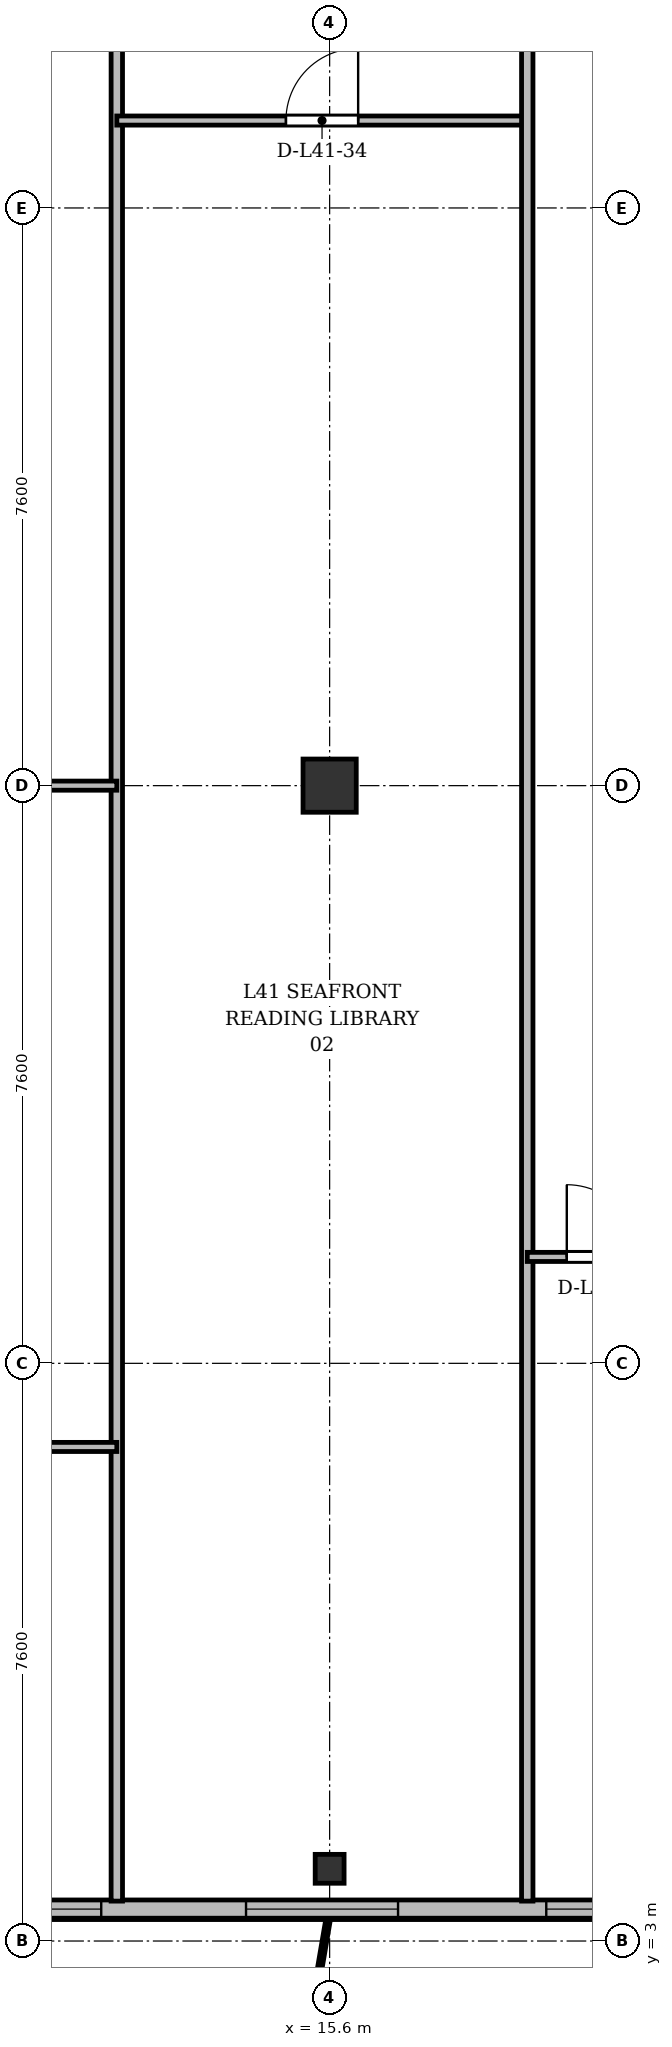
"""IFC4 building model, lengths in metres.
Left out: names, types, materials, properties, quantities, classifications, styles, units other than length and angle.
Written with IfcOpenShell. Run it as: python <this file> out.ifc"""

import sys

from ifc_helpers import new_model, si_unit, direction, frame, frame_2d, origin, origin_2d, place, context, subcontext, project, spatial, rectangle, i_section, extrude, source, transform, mapped, element, fill, save


model = new_model("IFC4")
c1 = context("Model", 3, precision=1e-05, world=origin(), true_north=direction((0.0, 1.0)))
c2 = subcontext(c1, "Body", "Model", "MODEL_VIEW")
j1 = project(units=[si_unit("LENGTHUNIT", "METRE"), si_unit("PLANEANGLEUNIT", "RADIAN")], contexts=[c1])
p1 = place(None, origin())
s1 = spatial("IfcSite", under=j1, at=p1, CompositionType="ELEMENT")
p2 = place(p1, origin())
s2 = spatial("IfcBuilding", under=s1, at=p2, CompositionType="ELEMENT")
p3 = place(p2, frame((0.0, 0.0, 157.3)))
s3 = spatial("IfcBuildingStorey", under=s2, at=p3, CompositionType="ELEMENT", Elevation=157.3)
m1 = source(origin(), c2, "Body", "SweptSolid", [
    extrude(i_section(OverallWidth=0.38, OverallDepth=0.38, WebThickness=0.02, FlangeThickness=0.03, at=origin_2d()), origin(), (0.0, 0.0, 1.0), 3.6),
])
p4 = place(p3, frame((15.6, 3.95, 0.0), z_axis=(0.0, 0.0, 1.0), x_axis=(1.0, 0.0, 0.0)))
e1 = element("IfcColumn", 1, at=p4, inside=s3, PredefinedType="COLUMN", context=c2, shape_type="MappedRepresentation", body=[
    mapped(m1, transform((0.0, 0.0, 0.0), x_axis=(1.0, 0.0, 0.0), y_axis=(0.0, 1.0, 0.0), z_axis=(0.0, 0.0, 1.0), scale=1.0)),
])
m2 = source(origin(), c2, "Body", "SweptSolid", [
    extrude(rectangle(XDim=0.7, YDim=0.7, at=origin_2d()), origin(), (0.0, 0.0, 1.0), 3.6),
])
p5 = place(p3, frame((15.6, 18.2, 0.0), z_axis=(0.0, 0.0, 1.0), x_axis=(1.0, 0.0, 0.0)))
e2 = element("IfcColumn", 2, at=p5, inside=s3, PredefinedType="COLUMN", context=c2, shape_type="MappedRepresentation", body=[
    mapped(m2, transform((0.0, 0.0, 0.0), x_axis=(1.0, 0.0, 0.0), y_axis=(0.0, 1.0, 0.0), z_axis=(0.0, 0.0, 1.0), scale=1.0)),
])
p6 = place(p3, frame((63.6, 3.42, 0.0), z_axis=(0.0, 0.0, 1.0), x_axis=(-1.0, 0.0, 0.0)))
e3 = element("IfcWall", 3, at=p6, inside=s3, PredefinedType="SOLIDWALL", context=c2, shape_type="SweptSolid", body=[
    extrude(rectangle(XDim=52.8, YDim=0.24, at=frame_2d((26.4, 0.0))), origin(), (0.0, 0.0, 1.0), 3.35),
])
p7 = place(p6, frame((0.295, 0.0, 0.9)))
e4 = element("IfcOpeningElement", 4, at=p7, cuts=e3, PredefinedType="OPENING", context=c2, shape_type="SweptSolid", body=[
    extrude(rectangle(XDim=1.5, YDim=1.75, at=frame_2d((0.75, 0.875))), frame((0.0, 0.13, 0.0), z_axis=(0.0, -1.0, 0.0), x_axis=(1.0, 0.0, 0.0)), (0.0, 0.0, 1.0), 0.26),
])
p8 = place(p6, frame((3.95, 0.0, 0.9)))
e5 = element("IfcOpeningElement", 5, at=p8, cuts=e3, PredefinedType="OPENING", context=c2, shape_type="SweptSolid", body=[
    extrude(rectangle(XDim=1.5, YDim=1.75, at=frame_2d((0.75, 0.875))), frame((0.0, 0.13, 0.0), z_axis=(0.0, -1.0, 0.0), x_axis=(1.0, 0.0, 0.0)), (0.0, 0.0, 1.0), 0.26),
])
p9 = place(p6, frame((7.635, 0.0, 0.0)))
e6 = element("IfcOpeningElement", 6, at=p9, cuts=e3, PredefinedType="OPENING", context=c2, shape_type="SweptSolid", body=[
    extrude(rectangle(XDim=1.2, YDim=2.2, at=frame_2d((0.6, 1.1))), frame((0.0, 0.13, 0.0), z_axis=(0.0, -1.0, 0.0), x_axis=(1.0, 0.0, 0.0)), (0.0, 0.0, 1.0), 0.26),
])
p10 = place(p6, frame((9.775, 0.0, 0.9)))
e7 = element("IfcOpeningElement", 7, at=p10, cuts=e3, PredefinedType="OPENING", context=c2, shape_type="SweptSolid", body=[
    extrude(rectangle(XDim=1.65, YDim=1.85, at=frame_2d((0.825, 0.925))), frame((0.0, 0.13, 0.0), z_axis=(0.0, -1.0, 0.0), x_axis=(1.0, 0.0, 0.0)), (0.0, 0.0, 1.0), 0.26),
])
p11 = place(p6, frame((12.1, 0.0, 0.9)))
e8 = element("IfcOpeningElement", 8, at=p11, cuts=e3, PredefinedType="OPENING", context=c2, shape_type="SweptSolid", body=[
    extrude(rectangle(XDim=1.8, YDim=1.8, at=frame_2d((0.9, 0.9))), frame((0.0, 0.13, 0.0), z_axis=(0.0, -1.0, 0.0), x_axis=(1.0, 0.0, 0.0)), (0.0, 0.0, 1.0), 0.26),
])
p12 = place(p6, frame((15.9, 0.0, 0.9)))
e9 = element("IfcOpeningElement", 9, at=p12, cuts=e3, PredefinedType="OPENING", context=c2, shape_type="SweptSolid", body=[
    extrude(rectangle(XDim=2.2, YDim=1.8, at=frame_2d((1.1, 0.9))), frame((0.0, 0.13, 0.0), z_axis=(0.0, -1.0, 0.0), x_axis=(1.0, 0.0, 0.0)), (0.0, 0.0, 1.0), 0.26),
])
p13 = place(p6, frame((22.65, 0.0, 0.9)))
e10 = element("IfcOpeningElement", 10, at=p13, cuts=e3, PredefinedType="OPENING", context=c2, shape_type="SweptSolid", body=[
    extrude(rectangle(XDim=1.5, YDim=1.75, at=frame_2d((0.75, 0.875))), frame((0.0, 0.13, 0.0), z_axis=(0.0, -1.0, 0.0), x_axis=(1.0, 0.0, 0.0)), (0.0, 0.0, 1.0), 0.26),
])
p14 = place(p6, frame((27.5, 0.0, 0.9)))
e11 = element("IfcOpeningElement", 11, at=p14, cuts=e3, PredefinedType="OPENING", context=c2, shape_type="SweptSolid", body=[
    extrude(rectangle(XDim=2.0, YDim=1.95, at=frame_2d((1.0, 0.975))), frame((0.0, 0.13, 0.0), z_axis=(0.0, -1.0, 0.0), x_axis=(1.0, 0.0, 0.0)), (0.0, 0.0, 1.0), 0.26),
])
p15 = place(p6, frame((30.675, 0.0, 0.9)))
e12 = element("IfcOpeningElement", 12, at=p15, cuts=e3, PredefinedType="OPENING", context=c2, shape_type="SweptSolid", body=[
    extrude(rectangle(XDim=1.65, YDim=1.85, at=frame_2d((0.825, 0.925))), frame((0.0, 0.13, 0.0), z_axis=(0.0, -1.0, 0.0), x_axis=(1.0, 0.0, 0.0)), (0.0, 0.0, 1.0), 0.26),
])
p16 = place(p6, frame((34.3, 0.0, 0.9)))
e13 = element("IfcOpeningElement", 13, at=p16, cuts=e3, PredefinedType="OPENING", context=c2, shape_type="SweptSolid", body=[
    extrude(rectangle(XDim=1.8, YDim=1.8, at=frame_2d((0.9, 0.9))), frame((0.0, 0.13, 0.0), z_axis=(0.0, -1.0, 0.0), x_axis=(1.0, 0.0, 0.0)), (0.0, 0.0, 1.0), 0.26),
])
p17 = place(p6, frame((39.3, 0.0, 0.9)))
e14 = element("IfcOpeningElement", 14, at=p17, cuts=e3, PredefinedType="OPENING", context=c2, shape_type="SweptSolid", body=[
    extrude(rectangle(XDim=2.2, YDim=1.8, at=frame_2d((1.1, 0.9))), frame((0.0, 0.13, 0.0), z_axis=(0.0, -1.0, 0.0), x_axis=(1.0, 0.0, 0.0)), (0.0, 0.0, 1.0), 0.26),
])
p18 = place(p6, frame((43.65, 0.0, 0.9)))
e15 = element("IfcOpeningElement", 15, at=p18, cuts=e3, PredefinedType="OPENING", context=c2, shape_type="SweptSolid", body=[
    extrude(rectangle(XDim=1.5, YDim=1.75, at=frame_2d((0.75, 0.875))), frame((0.0, 0.13, 0.0), z_axis=(0.0, -1.0, 0.0), x_axis=(1.0, 0.0, 0.0)), (0.0, 0.0, 1.0), 0.26),
])
p19 = place(p6, frame((47.1, 0.0, 0.9)))
e16 = element("IfcOpeningElement", 16, at=p19, cuts=e3, PredefinedType="OPENING", context=c2, shape_type="SweptSolid", body=[
    extrude(rectangle(XDim=2.0, YDim=1.95, at=frame_2d((1.0, 0.975))), frame((0.0, 0.13, 0.0), z_axis=(0.0, -1.0, 0.0), x_axis=(1.0, 0.0, 0.0)), (0.0, 0.0, 1.0), 0.26),
])
p20 = place(p6, frame((51.005, 0.0, 0.9)))
e17 = element("IfcOpeningElement", 17, at=p20, cuts=e3, PredefinedType="OPENING", context=c2, shape_type="SweptSolid", body=[
    extrude(rectangle(XDim=1.5, YDim=1.75, at=frame_2d((0.75, 0.875))), frame((0.0, 0.13, 0.0), z_axis=(0.0, -1.0, 0.0), x_axis=(1.0, 0.0, 0.0)), (0.0, 0.0, 1.0), 0.26),
])
p21 = place(p6, frame((37.85, 0.0, 0.0)))
e18 = element("IfcOpeningElement", 18, at=p21, cuts=e3, PredefinedType="OPENING", context=c2, shape_type="SweptSolid", body=[
    extrude(rectangle(XDim=1.2, YDim=2.2, at=frame_2d((0.6, 1.1))), frame((0.0, 0.13, 0.0), z_axis=(0.0, -1.0, 0.0), x_axis=(1.0, 0.0, 0.0)), (0.0, 0.0, 1.0), 0.26),
])
p22 = place(p3, frame((12.8, 3.525, 0.0), z_axis=(0.0, 0.0, 1.0), x_axis=(0.0, 1.0, 0.0)))
e19 = element("IfcWall", 19, at=p22, inside=s3, PredefinedType="PARTITIONING", context=c2, shape_type="SweptSolid", body=[
    extrude(rectangle(XDim=27.275, YDim=0.15, at=frame_2d((13.638, 0.0))), origin(), (0.0, 0.0, 1.0), 2.75),
])
p23 = place(p3, frame((8.04, 18.2, 0.0), z_axis=(0.0, 0.0, 1.0), x_axis=(1.0, 0.0, 0.0)))
e20 = element("IfcWall", 20, at=p23, inside=s3, PredefinedType="PARTITIONING", context=c2, shape_type="SweptSolid", body=[
    extrude(rectangle(XDim=4.76, YDim=0.12, at=frame_2d((2.38, 0.0))), origin(), (0.0, 0.0, 1.0), 2.75),
])
p24 = place(p23, frame((1.905, 0.0, 0.0)))
e21 = element("IfcOpeningElement", 21, at=p24, cuts=e20, PredefinedType="OPENING", context=c2, shape_type="SweptSolid", body=[
    extrude(rectangle(XDim=0.95, YDim=2.15, at=frame_2d((0.475, 1.075))), frame((0.0, 0.07, 0.0), z_axis=(0.0, -1.0, 0.0), x_axis=(1.0, 0.0, 0.0)), (0.0, 0.0, 1.0), 0.14),
])
p25 = place(p3, frame((8.04, 9.5, 0.0), z_axis=(0.0, 0.0, 1.0), x_axis=(1.0, 0.0, 0.0)))
e22 = element("IfcWall", 22, at=p25, inside=s3, PredefinedType="PARTITIONING", context=c2, shape_type="SweptSolid", body=[
    extrude(rectangle(XDim=4.76, YDim=0.12, at=frame_2d((2.38, 0.0))), origin(), (0.0, 0.0, 1.0), 2.85),
])
p26 = place(p25, frame((1.905, 0.0, 0.0)))
e23 = element("IfcOpeningElement", 23, at=p26, cuts=e22, PredefinedType="OPENING", context=c2, shape_type="SweptSolid", body=[
    extrude(rectangle(XDim=0.95, YDim=2.15, at=frame_2d((0.475, 1.075))), frame((0.0, 0.07, 0.0), z_axis=(0.0, -1.0, 0.0), x_axis=(1.0, 0.0, 0.0)), (0.0, 0.0, 1.0), 0.14),
])
p27 = place(p3, frame((12.8, 26.95, 0.0), z_axis=(0.0, 0.0, 1.0), x_axis=(1.0, 0.0, 0.0)))
e24 = element("IfcWall", 24, at=p27, inside=s3, PredefinedType="PARTITIONING", context=c2, shape_type="SweptSolid", body=[
    extrude(rectangle(XDim=5.4, YDim=0.12, at=frame_2d((2.7, 0.0))), origin(), (0.0, 0.0, 1.0), 2.85),
])
p28 = place(p27, frame((2.225, 0.0, 0.0)))
e25 = element("IfcOpeningElement", 25, at=p28, cuts=e24, PredefinedType="OPENING", context=c2, shape_type="SweptSolid", body=[
    extrude(rectangle(XDim=0.95, YDim=2.15, at=frame_2d((0.475, 1.075))), frame((0.0, 0.07, 0.0), z_axis=(0.0, -1.0, 0.0), x_axis=(1.0, 0.0, 0.0)), (0.0, 0.0, 1.0), 0.14),
])
p29 = place(p3, frame((18.2, 3.525, 0.0), z_axis=(0.0, 0.0, 1.0), x_axis=(0.0, 1.0, 0.0)))
e26 = element("IfcWall", 26, at=p29, inside=s3, PredefinedType="PARTITIONING", context=c2, shape_type="SweptSolid", body=[
    extrude(rectangle(XDim=27.275, YDim=0.15, at=frame_2d((13.638, 0.0))), origin(), (0.0, 0.0, 1.0), 2.75),
])
p30 = place(p3, frame((18.2, 12.0, 0.0), z_axis=(0.0, 0.0, 1.0), x_axis=(1.0, 0.0, 0.0)))
e27 = element("IfcWall", 27, at=p30, inside=s3, PredefinedType="PARTITIONING", context=c2, shape_type="SweptSolid", body=[
    extrude(rectangle(XDim=2.0, YDim=0.12, at=frame_2d((1.0, 0.0))), origin(), (0.0, 0.0, 1.0), 3.35),
])
p31 = place(p30, frame((0.52, 0.0, 0.0)))
e28 = element("IfcOpeningElement", 28, at=p31, cuts=e27, PredefinedType="OPENING", context=c2, shape_type="SweptSolid", body=[
    extrude(rectangle(XDim=0.95, YDim=2.15, at=frame_2d((0.475, 1.075))), frame((0.0, 0.07, 0.0), z_axis=(0.0, -1.0, 0.0), x_axis=(1.0, 0.0, 0.0)), (0.0, 0.0, 1.0), 0.14),
])
m3 = source(origin(), c2, "Body", "SweptSolid", [
    extrude(rectangle(XDim=1.5, YDim=1.75, at=frame_2d((0.75, 0.875))), frame((0.0, 0.03, 0.0), z_axis=(0.0, -1.0, 0.0), x_axis=(1.0, 0.0, 0.0)), (0.0, 0.0, 1.0), 0.06),
])
p32 = place(p18, origin())
e29 = element("IfcWindow", 29, at=p32, inside=s3, PartitioningType="SINGLE_PANEL", PredefinedType="WINDOW", context=c2, shape_type="MappedRepresentation", body=[
    mapped(m3, transform((0.0, 0.0, 0.0), x_axis=(1.0, 0.0, 0.0), y_axis=(0.0, 1.0, 0.0), z_axis=(0.0, 0.0, 1.0), scale=1.0)),
])
fill(e15, e29)
m4 = source(origin(), c2, "Body", "SweptSolid", [
    extrude(rectangle(XDim=2.0, YDim=1.95, at=frame_2d((1.0, 0.975))), frame((0.0, 0.03, 0.0), z_axis=(0.0, -1.0, 0.0), x_axis=(1.0, 0.0, 0.0)), (0.0, 0.0, 1.0), 0.06),
])
p33 = place(p19, origin())
e30 = element("IfcWindow", 30, at=p33, inside=s3, PartitioningType="SINGLE_PANEL", PredefinedType="WINDOW", context=c2, shape_type="MappedRepresentation", body=[
    mapped(m4, transform((0.0, 0.0, 0.0), x_axis=(1.0, 0.0, 0.0), y_axis=(0.0, 1.0, 0.0), z_axis=(0.0, 0.0, 1.0), scale=1.0)),
])
fill(e16, e30)
p34 = place(p20, origin())
e31 = element("IfcWindow", 31, at=p34, inside=s3, PartitioningType="SINGLE_PANEL", PredefinedType="WINDOW", context=c2, shape_type="MappedRepresentation", body=[
    mapped(m3, transform((0.0, 0.0, 0.0), x_axis=(1.0, 0.0, 0.0), y_axis=(0.0, 1.0, 0.0), z_axis=(0.0, 0.0, 1.0), scale=1.0)),
])
fill(e17, e31)
m5 = source(origin(), c2, "Body", "SweptSolid", [
    extrude(rectangle(XDim=0.95, YDim=2.15, at=frame_2d((0.475, 1.075))), frame((0.0, 0.025, 0.0), z_axis=(0.0, -1.0, 0.0), x_axis=(1.0, 0.0, 0.0)), (0.0, 0.0, 1.0), 0.05),
])
p35 = place(p28, origin())
e32 = element("IfcDoor", 32, at=p35, inside=s3, OperationType="SINGLE_SWING_RIGHT", PredefinedType="DOOR", context=c2, shape_type="MappedRepresentation", body=[
    mapped(m5, transform((0.0, 0.0, 0.0), x_axis=(1.0, 0.0, 0.0), y_axis=(0.0, 1.0, 0.0), z_axis=(0.0, 0.0, 1.0), scale=1.0)),
])
fill(e25, e32)
p36 = place(p31, origin())
e33 = element("IfcDoor", 33, at=p36, inside=s3, OperationType="SINGLE_SWING_LEFT", PredefinedType="DOOR", context=c2, shape_type="MappedRepresentation", body=[
    mapped(m5, transform((0.0, 0.0, 0.0), x_axis=(1.0, 0.0, 0.0), y_axis=(0.0, 1.0, 0.0), z_axis=(0.0, 0.0, 1.0), scale=1.0)),
])
fill(e28, e33)
save(model, sys.argv[1])
